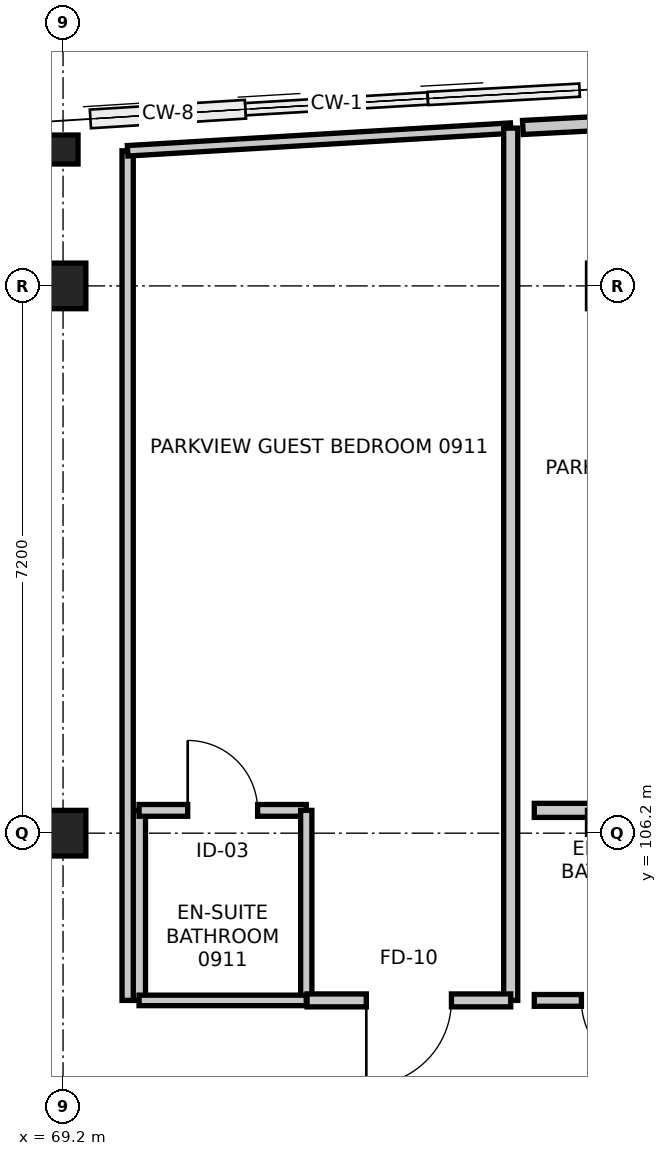
"""IFC4 building model, lengths in metres.
Left out: names, types, materials, properties, quantities, classifications, styles, units other than length and angle.
Written with IfcOpenShell. Run it as: python <this file> out.ifc"""

import sys

from ifc_helpers import new_model, si_unit, direction, frame, frame_2d, origin, origin_2d, place, context, subcontext, project, spatial, rectangle, i_section, extrude, element, fill, save


model = new_model("IFC4")
c1 = context("Model", 3, precision=1e-05, world=origin(), true_north=direction((0.0, 1.0)))
c2 = subcontext(c1, "Body", "Model", "MODEL_VIEW")
j1 = project(units=[si_unit("LENGTHUNIT", "METRE"), si_unit("PLANEANGLEUNIT", "RADIAN")], contexts=[c1])
p1 = place(None, origin())
s1 = spatial("IfcSite", under=j1, at=p1, CompositionType="ELEMENT")
p2 = place(p1, origin())
s2 = spatial("IfcBuilding", under=s1, at=p2, CompositionType="ELEMENT")
p3 = place(p2, frame((0.0, 0.0, 37.2)))
s3 = spatial("IfcBuildingStorey", under=s2, at=p3, CompositionType="ELEMENT", Elevation=37.2)
for number, where, z_axis, x_axis in (
    (1, (69.2, 106.2, 0.0), (0.0, 0.0, 1.0), (1.0, 0.0, 0.0)),
    (2, (69.2, 113.4, 0.0), (0.0, 0.0, 1.0), (1.0, 0.0, 0.0)),
):
    element("IfcColumn", number, at=place(p3, frame(where, z_axis=z_axis, x_axis=x_axis)), inside=s3, PredefinedType="COLUMN", context=c2, shape_type="SweptSolid", body=[
        extrude(rectangle(XDim=0.6, YDim=0.6, at=origin_2d()), origin(), (0.0, 0.0, 1.0), 3.6),
    ])
p4 = place(p3, frame((69.2, 115.194, 0.0), z_axis=(0.0, 0.0, 1.0), x_axis=(1.0, 0.0, 0.0)))
e3 = element("IfcColumn", 3, at=p4, inside=s3, PredefinedType="COLUMN", context=c2, shape_type="SweptSolid", body=[
    extrude(i_section(OverallWidth=0.395, OverallDepth=0.381, WebThickness=0.018, FlangeThickness=0.03, FilletRadius=0.015, at=origin_2d()), origin(), (0.0, 0.0, 1.0), 3.6),
])
p5 = place(p3, frame((70.2, 104.0, 0.0), z_axis=(0.0, 0.0, 1.0), x_axis=(0.0, 1.0, 0.0)))
e4 = element("IfcWall", 4, at=p5, inside=s3, PredefinedType="PARTITIONING", context=c2, shape_type="SweptSolid", body=[
    extrude(rectangle(XDim=2.5, YDim=0.17, at=frame_2d((1.25, 0.0))), origin(), (0.0, 0.0, 1.0), 2.765),
])
p6 = place(p3, frame((70.2, 106.5, 0.0), z_axis=(0.0, 0.0, 1.0), x_axis=(1.0, 0.0, 0.0)))
e5 = element("IfcWall", 5, at=p6, inside=s3, PredefinedType="PARTITIONING", context=c2, shape_type="SweptSolid", body=[
    extrude(rectangle(XDim=2.2, YDim=0.155, at=frame_2d((1.1, 0.0))), origin(), (0.0, 0.0, 1.0), 3.38),
])
p7 = place(p6, frame((0.64, 0.0, 0.0)))
e6 = element("IfcOpeningElement", 6, at=p7, cuts=e5, PredefinedType="OPENING", context=c2, shape_type="SweptSolid", body=[
    extrude(rectangle(XDim=0.92, YDim=2.1, at=frame_2d((0.46, 1.05))), frame((0.0, 0.087, 0.0), z_axis=(0.0, -1.0, 0.0), x_axis=(1.0, 0.0, 0.0)), (0.0, 0.0, 1.0), 0.175),
])
p8 = place(p3, frame((72.4, 106.5, 0.0), z_axis=(0.0, 0.0, 1.0), x_axis=(0.0, -1.0, 0.0)))
e7 = element("IfcWall", 7, at=p8, inside=s3, PredefinedType="PARTITIONING", context=c2, shape_type="SweptSolid", body=[
    extrude(rectangle(XDim=2.5, YDim=0.148, at=frame_2d((1.25, 0.0))), origin(), (0.0, 0.0, 1.0), 2.765),
])
p9 = place(p3, frame((72.4, 104.0, 0.0), z_axis=(0.0, 0.0, 1.0), x_axis=(-1.0, 0.0, 0.0)))
e8 = element("IfcWall", 8, at=p9, inside=s3, PredefinedType="PARTITIONING", context=c2, shape_type="SweptSolid", body=[
    extrude(rectangle(XDim=2.2, YDim=0.138, at=frame_2d((1.1, 0.0))), origin(), (0.0, 0.0, 1.0), 3.38),
])
p10 = place(p3, frame((70.05, 104.0, 0.0), z_axis=(0.0, 0.0, 1.0), x_axis=(0.0, 1.0, 0.0)))
e9 = element("IfcWall", 9, at=p10, inside=s3, PredefinedType="PARTITIONING", context=c2, shape_type="SweptSolid", body=[
    extrude(rectangle(XDim=11.177, YDim=0.148, at=frame_2d((5.589, 0.0))), origin(), (0.0, 0.0, 1.0), 2.765),
])
p11 = place(p3, frame((70.05, 115.177, 0.0), z_axis=(0.0, 0.0, 1.0), x_axis=(0.998255479729, 0.059042333886, 0.0)))
e10 = element("IfcWall", 10, at=p11, inside=s3, PredefinedType="PARTITIONING", context=c2, shape_type="SweptSolid", body=[
    extrude(rectangle(XDim=5.049, YDim=0.138, at=frame_2d((2.524, 0.0))), origin(), (0.0, 0.0, 1.0), 2.956),
])
p12 = place(p3, frame((75.09, 115.476, 0.0), z_axis=(0.0, 0.0, 1.0), x_axis=(0.0, -1.0, 0.0)))
e11 = element("IfcWall", 11, at=p12, inside=s3, PredefinedType="PARTITIONING", context=c2, shape_type="SweptSolid", body=[
    extrude(rectangle(XDim=11.476, YDim=0.185, at=frame_2d((5.738, 0.0))), origin(), (0.0, 0.0, 1.0), 2.765),
])
p13 = place(p3, frame((75.09, 104.0, 0.0), z_axis=(0.0, 0.0, 1.0), x_axis=(-1.0, 0.0, 0.0)))
e12 = element("IfcWall", 12, at=p13, inside=s3, PredefinedType="PARTITIONING", context=c2, shape_type="SweptSolid", body=[
    extrude(rectangle(XDim=2.68, YDim=0.17, at=frame_2d((1.34, 0.0))), origin(), (0.0, 0.0, 1.0), 3.38),
])
p14 = place(p13, frame((0.78, 0.0, 0.0)))
e13 = element("IfcOpeningElement", 13, at=p14, cuts=e12, PredefinedType="OPENING", context=c2, shape_type="SweptSolid", body=[
    extrude(rectangle(XDim=1.12, YDim=2.2, at=frame_2d((0.56, 1.1))), frame((0.0, 0.095, 0.0), z_axis=(0.0, -1.0, 0.0), x_axis=(1.0, 0.0, 0.0)), (0.0, 0.0, 1.0), 0.19),
])
p15 = place(p3, frame((75.4, 106.5, 0.0), z_axis=(0.0, 0.0, 1.0), x_axis=(1.0, 0.0, 0.0)))
e14 = element("IfcWall", 14, at=p15, inside=s3, PredefinedType="PARTITIONING", context=c2, shape_type="SweptSolid", body=[
    extrude(rectangle(XDim=2.2, YDim=0.185, at=frame_2d((1.1, 0.0))), origin(), (0.0, 0.0, 1.0), 2.715),
])
p16 = place(p3, frame((77.6, 104.0, 0.0), z_axis=(0.0, 0.0, 1.0), x_axis=(-1.0, 0.0, 0.0)))
e15 = element("IfcWall", 15, at=p16, inside=s3, PredefinedType="PARTITIONING", context=c2, shape_type="SweptSolid", body=[
    extrude(rectangle(XDim=2.2, YDim=0.155, at=frame_2d((1.1, 0.0))), origin(), (0.0, 0.0, 1.0), 2.715),
])
p17 = place(p16, frame((0.62, 0.0, 0.0)))
e16 = element("IfcOpeningElement", 16, at=p17, cuts=e15, PredefinedType="OPENING", context=c2, shape_type="SweptSolid", body=[
    extrude(rectangle(XDim=0.96, YDim=2.14, at=frame_2d((0.48, 1.07))), frame((0.0, 0.087, 0.0), z_axis=(0.0, -1.0, 0.0), x_axis=(1.0, 0.0, 0.0)), (0.0, 0.0, 1.0), 0.175),
])
p18 = place(p3, frame((75.25, 115.484, 0.0), z_axis=(0.0, 0.0, 1.0), x_axis=(0.998624236073, 0.052436963374, 0.0)))
e17 = element("IfcWall", 17, at=p18, inside=s3, PredefinedType="PARTITIONING", context=c2, shape_type="SweptSolid", body=[
    extrude(rectangle(XDim=2.523, YDim=0.185, at=frame_2d((1.262, 0.0))), origin(), (0.0, 0.0, 1.0), 2.956),
])
p19 = place(p7, origin())
e18 = element("IfcDoor", 18, at=p19, inside=s3, OperationType="SINGLE_SWING_LEFT", PredefinedType="DOOR", context=c2, shape_type="SweptSolid", body=[
    extrude(rectangle(XDim=0.92, YDim=2.1, at=frame_2d((0.46, 1.05))), frame((0.0, 0.025, 0.0), z_axis=(0.0, -1.0, 0.0), x_axis=(1.0, 0.0, 0.0)), (0.0, 0.0, 1.0), 0.05),
])
fill(e6, e18)
p20 = place(p14, origin())
e19 = element("IfcDoor", 19, at=p20, inside=s3, OperationType="SINGLE_SWING_RIGHT", PredefinedType="DOOR", context=c2, shape_type="SweptSolid", body=[
    extrude(rectangle(XDim=1.12, YDim=2.2, at=frame_2d((0.56, 1.1))), frame((0.0, 0.025, 0.0), z_axis=(0.0, -1.0, 0.0), x_axis=(1.0, 0.0, 0.0)), (0.0, 0.0, 1.0), 0.05),
])
fill(e13, e19)
p21 = place(p17, origin())
e20 = element("IfcDoor", 20, at=p21, inside=s3, OperationType="SINGLE_SWING_LEFT", PredefinedType="DOOR", context=c2, shape_type="SweptSolid", body=[
    extrude(rectangle(XDim=0.96, YDim=2.14, at=frame_2d((0.48, 1.07))), frame((0.0, 0.025, 0.0), z_axis=(0.0, -1.0, 0.0), x_axis=(1.0, 0.0, 0.0)), (0.0, 0.0, 1.0), 0.05),
])
fill(e16, e20)
save(model, sys.argv[1])
